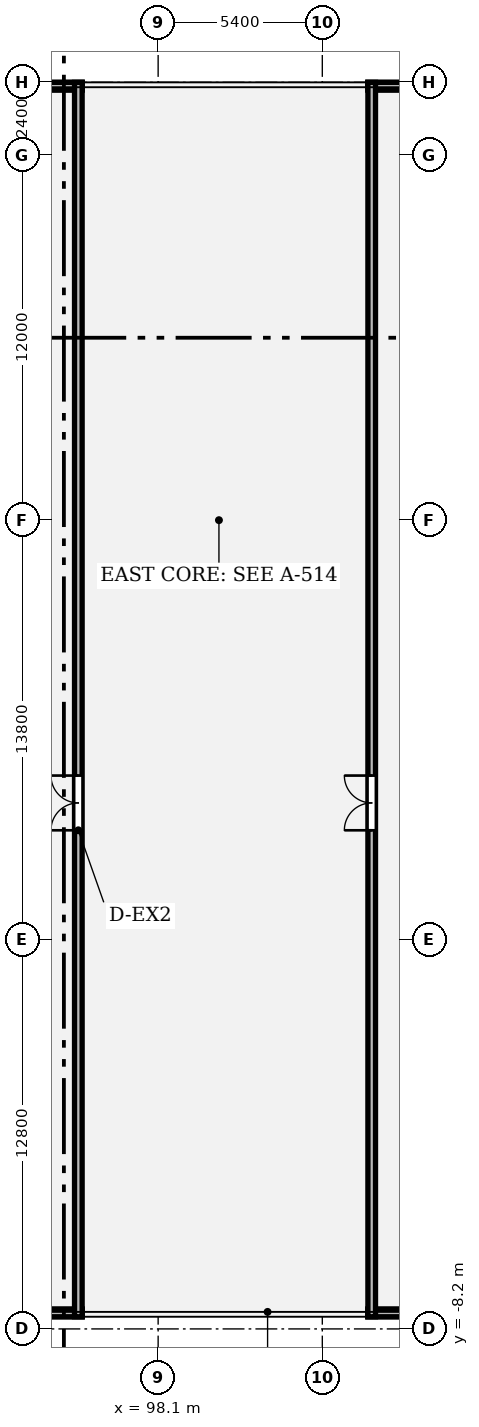
"""IFC4 building model, lengths in metres.
Left out: names, types, materials, properties, quantities, classifications, styles, units other than length and angle.
Written with IfcOpenShell. Run it as: python <this file> out.ifc"""

import sys

from ifc_helpers import new_model, si_unit, direction, frame, frame_2d, origin, place, context, subcontext, project, spatial, rectangle, extrude, element, fill, save


model = new_model("IFC4")
c1 = context("Model", 3, precision=1e-05, world=origin(), true_north=direction((0.0, 1.0)))
c2 = subcontext(c1, "Body", "Model", "MODEL_VIEW")
j1 = project(units=[si_unit("LENGTHUNIT", "METRE"), si_unit("PLANEANGLEUNIT", "RADIAN")], contexts=[c1])
p1 = place(None, origin())
s1 = spatial("IfcSite", under=j1, at=p1, CompositionType="ELEMENT")
p2 = place(p1, origin())
s2 = spatial("IfcBuilding", under=s1, at=p2, CompositionType="ELEMENT")
p3 = place(p2, frame((0.0, 0.0, 207.6)))
s3 = spatial("IfcBuildingStorey", under=s2, at=p3, CompositionType="ELEMENT", Elevation=207.6)
p4 = place(p3, frame((70.9, -7.675, 0.0), z_axis=(0.0, 0.0, 1.0), x_axis=(1.0, 0.0, 0.0)))
e1 = element("IfcWall", 1, at=p4, inside=s3, PredefinedType="SHEAR", context=c2, shape_type="SweptSolid", body=[
    extrude(rectangle(XDim=24.7, YDim=0.25, at=frame_2d((12.35, 0.0))), origin(), (0.0, 0.0, 1.0), 5.85),
])
p5 = place(p3, frame((92.6, -7.675, 5.85), z_axis=(0.0, 0.0, 1.0), x_axis=(1.0, 0.0, 0.0)))
e2 = element("IfcWall", 2, at=p5, inside=s3, PredefinedType="SHEAR", context=c2, shape_type="SweptSolid", body=[
    extrude(rectangle(XDim=3.0, YDim=0.25, at=frame_2d((1.5, 0.0))), origin(), (0.0, 0.0, 1.0), 3.8),
])
p6 = place(p3, frame((95.6, 32.675, 0.0), z_axis=(0.0, 0.0, 1.0), x_axis=(-1.0, 0.0, 0.0)))
e3 = element("IfcWall", 3, at=p6, inside=s3, PredefinedType="SHEAR", context=c2, shape_type="SweptSolid", body=[
    extrude(rectangle(XDim=24.7, YDim=0.25, at=frame_2d((12.35, 0.0))), origin(), (0.0, 0.0, 1.0), 5.85),
])
p7 = place(p3, frame((95.6, 32.675, 5.85), z_axis=(0.0, 0.0, 1.0), x_axis=(-1.0, 0.0, 0.0)))
e4 = element("IfcWall", 4, at=p7, inside=s3, PredefinedType="SHEAR", context=c2, shape_type="SweptSolid", body=[
    extrude(rectangle(XDim=3.0, YDim=0.25, at=frame_2d((1.5, 0.0))), origin(), (0.0, 0.0, 1.0), 3.8),
])
p8 = place(p3, frame((95.475, -7.8, 0.0), z_axis=(0.0, 0.0, 1.0), x_axis=(0.0, 1.0, 0.0)))
e5 = element("IfcWall", 5, at=p8, inside=s3, PredefinedType="SHEAR", context=c2, shape_type="SweptSolid", body=[
    extrude(rectangle(XDim=40.6, YDim=0.25, at=frame_2d((20.3, 0.0))), origin(), (0.0, 0.0, 1.0), 9.65),
])
p9 = place(p8, frame((16.0, 0.0, 0.0)))
e6 = element("IfcOpeningElement", 6, at=p9, cuts=e5, PredefinedType="OPENING", context=c2, shape_type="SweptSolid", body=[
    extrude(rectangle(XDim=1.8, YDim=2.2, at=frame_2d((0.9, 1.1))), frame((0.0, 0.135, 0.0), z_axis=(0.0, -1.0, 0.0), x_axis=(1.0, 0.0, 0.0)), (0.0, 0.0, 1.0), 0.27),
])
p10 = place(p3, frame((105.0, -7.675, 0.0), z_axis=(0.0, 0.0, 1.0), x_axis=(1.0, 0.0, 0.0)))
e7 = element("IfcWall", 7, at=p10, inside=s3, PredefinedType="SHEAR", context=c2, shape_type="SweptSolid", body=[
    extrude(rectangle(XDim=27.5, YDim=0.25, at=frame_2d((13.75, 0.0))), origin(), (0.0, 0.0, 1.0), 10.35),
])
p11 = place(p3, frame((105.0, -7.675, 10.35), z_axis=(0.0, 0.0, 1.0), x_axis=(1.0, 0.0, 0.0)))
e8 = element("IfcWall", 8, at=p11, inside=s3, PredefinedType="SHEAR", context=c2, shape_type="SweptSolid", body=[
    extrude(rectangle(XDim=3.0, YDim=0.25, at=frame_2d((1.5, 0.0))), origin(), (0.0, 0.0, 1.0), 3.8),
])
p12 = place(p3, frame((132.5, 32.675, 0.0), z_axis=(0.0, 0.0, 1.0), x_axis=(-1.0, 0.0, 0.0)))
e9 = element("IfcWall", 9, at=p12, inside=s3, PredefinedType="SHEAR", context=c2, shape_type="SweptSolid", body=[
    extrude(rectangle(XDim=27.5, YDim=0.25, at=frame_2d((13.75, 0.0))), origin(), (0.0, 0.0, 1.0), 10.35),
])
p13 = place(p3, frame((108.0, 32.675, 10.35), z_axis=(0.0, 0.0, 1.0), x_axis=(-1.0, 0.0, 0.0)))
e10 = element("IfcWall", 10, at=p13, inside=s3, PredefinedType="SHEAR", context=c2, shape_type="SweptSolid", body=[
    extrude(rectangle(XDim=3.0, YDim=0.25, at=frame_2d((1.5, 0.0))), origin(), (0.0, 0.0, 1.0), 3.8),
])
p14 = place(p3, frame((105.125, -7.8, 0.0), z_axis=(0.0, 0.0, 1.0), x_axis=(0.0, 1.0, 0.0)))
e11 = element("IfcWall", 11, at=p14, inside=s3, PredefinedType="SHEAR", context=c2, shape_type="SweptSolid", body=[
    extrude(rectangle(XDim=40.6, YDim=0.25, at=frame_2d((20.3, 0.0))), origin(), (0.0, 0.0, 1.0), 14.15),
])
p15 = place(p14, frame((16.0, 0.0, 0.0)))
e12 = element("IfcOpeningElement", 12, at=p15, cuts=e11, PredefinedType="OPENING", context=c2, shape_type="SweptSolid", body=[
    extrude(rectangle(XDim=1.8, YDim=2.2, at=frame_2d((0.9, 1.1))), frame((0.0, 0.135, 0.0), z_axis=(0.0, -1.0, 0.0), x_axis=(1.0, 0.0, 0.0)), (0.0, 0.0, 1.0), 0.27),
])
p16 = place(p9, origin())
e13 = element("IfcDoor", 13, at=p16, inside=s3, OperationType="DOUBLE_DOOR_SINGLE_SWING", PredefinedType="DOOR", context=c2, shape_type="SweptSolid", body=[
    extrude(rectangle(XDim=1.8, YDim=2.2, at=frame_2d((0.9, 1.1))), frame((0.0, 0.025, 0.0), z_axis=(0.0, -1.0, 0.0), x_axis=(1.0, 0.0, 0.0)), (0.0, 0.0, 1.0), 0.05),
])
fill(e6, e13)
p17 = place(p15, origin())
e14 = element("IfcDoor", 14, at=p17, inside=s3, OperationType="DOUBLE_DOOR_SINGLE_SWING", PredefinedType="DOOR", context=c2, shape_type="SweptSolid", body=[
    extrude(rectangle(XDim=1.8, YDim=2.2, at=frame_2d((0.9, 1.1))), frame((0.0, 0.025, 0.0), z_axis=(0.0, -1.0, 0.0), x_axis=(1.0, 0.0, 0.0)), (0.0, 0.0, 1.0), 0.05),
])
fill(e12, e14)
save(model, sys.argv[1])
